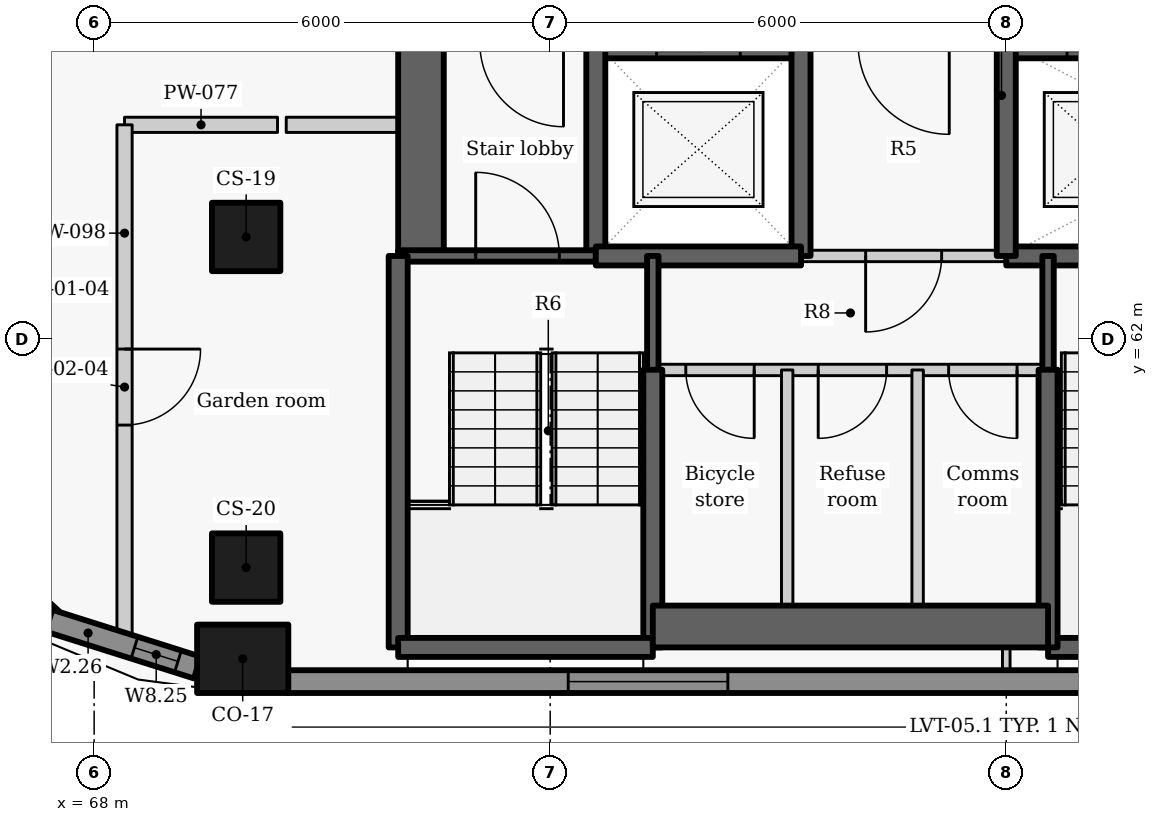
"""IFC4 building model, lengths in metres.
Left out: names, types, materials, properties, quantities, classifications, styles, units other than length and angle.
Written with IfcOpenShell. Run it as: python <this file> out.ifc"""

import sys

from ifc_helpers import new_model, si_unit, direction, frame, frame_2d, origin, origin_2d, place, context, subcontext, project, spatial, rectangle, extrude, element, fill, save


model = new_model("IFC4")
c1 = context("Model", 3, precision=1e-05, world=origin(), true_north=direction((0.0, 1.0)))
c2 = subcontext(c1, "Body", "Model", "MODEL_VIEW")
j1 = project(units=[si_unit("LENGTHUNIT", "METRE"), si_unit("PLANEANGLEUNIT", "RADIAN")], contexts=[c1])
p1 = place(None, origin())
s1 = spatial("IfcSite", under=j1, at=p1, CompositionType="ELEMENT")
p2 = place(p1, origin())
s2 = spatial("IfcBuilding", under=s1, at=p2, CompositionType="ELEMENT")
p3 = place(p2, frame((0.0, 0.0, 176.7)))
s3 = spatial("IfcBuildingStorey", under=s2, at=p3, CompositionType="ELEMENT", Elevation=176.7)
p4 = place(p3, frame((69.955, 57.8, 0.0), z_axis=(0.0, 0.0, 1.0), x_axis=(1.0, 0.0, 0.0)))
e1 = element("IfcColumn", 1, at=p4, inside=s3, PredefinedType="COLUMN", context=c2, shape_type="SweptSolid", body=[
    extrude(rectangle(XDim=1.2, YDim=0.9, at=origin_2d()), origin(), (0.0, 0.0, 1.0), 3.3),
])
for number, where, z_axis, x_axis in (
    (2, (70.0, 63.35, 0.0), (0.0, 0.0, 1.0), (0.0, -1.0, 0.0)),
    (3, (70.0, 59.0, 0.0), (0.0, 0.0, 1.0), (0.0, -1.0, 0.0)),
):
    element("IfcColumn", number, at=place(p3, frame(where, z_axis=z_axis, x_axis=x_axis)), inside=s3, PredefinedType="COLUMN", context=c2, shape_type="SweptSolid", body=[
        extrude(rectangle(XDim=0.9, YDim=0.9, at=origin_2d()), origin(), (0.0, 0.0, 1.0), 3.3),
    ])
p5 = place(p3, frame((66.022, 59.622, 0.0), z_axis=(0.0, 0.0, 1.0), x_axis=(0.734627852992, -0.678470277616, 0.0)))
e4 = element("IfcWall", 4, at=p5, inside=s3, PredefinedType="SOLIDWALL", context=c2, shape_type="SweptSolid", body=[
    extrude(rectangle(XDim=2.026, YDim=0.3, at=frame_2d((1.013, 0.0))), origin(), (0.0, 0.0, 1.0), 2.425),
])
p6 = place(p3, frame((67.406, 58.302, 0.0), z_axis=(0.0, 0.0, 1.0), x_axis=(0.953537608367, -0.301274010545, 0.0)))
e5 = element("IfcWall", 5, at=p6, inside=s3, PredefinedType="SOLIDWALL", context=c2, shape_type="SweptSolid", body=[
    extrude(rectangle(XDim=2.048, YDim=0.3, at=frame_2d((1.024, 0.0))), origin(), (0.0, 0.0, 1.0), 2.425),
])
p7 = place(p6, frame((1.18, 0.0, 0.9)))
e6 = element("IfcOpeningElement", 6, at=p7, cuts=e5, PredefinedType="OPENING", context=c2, shape_type="SweptSolid", body=[
    extrude(rectangle(XDim=0.6, YDim=1.1, at=frame_2d((0.3, 0.55))), frame((0.0, 0.16, 0.0), z_axis=(0.0, -1.0, 0.0), x_axis=(1.0, 0.0, 0.0)), (0.0, 0.0, 1.0), 0.32),
])
p8 = place(p3, frame((70.551, 57.5, 0.0), z_axis=(0.0, 0.0, 1.0), x_axis=(1.0, 0.0, 0.0)))
e7 = element("IfcWall", 7, at=p8, inside=s3, PredefinedType="SOLIDWALL", context=c2, shape_type="SweptSolid", body=[
    extrude(rectangle(XDim=18.893, YDim=0.3, at=frame_2d((9.446, 0.0))), origin(), (0.0, 0.0, 1.0), 2.425),
])
p9 = place(p8, frame((3.687, 0.0, 0.9)))
e8 = element("IfcOpeningElement", 8, at=p9, cuts=e7, PredefinedType="OPENING", context=c2, shape_type="SweptSolid", body=[
    extrude(rectangle(XDim=2.1, YDim=1.1, at=frame_2d((1.05, 0.55))), frame((0.0, 0.16, 0.0), z_axis=(0.0, -1.0, 0.0), x_axis=(1.0, 0.0, 0.0)), (0.0, 0.0, 1.0), 0.32),
])
p10 = place(p8, frame((13.109, 0.0, 0.9)))
e9 = element("IfcOpeningElement", 9, at=p10, cuts=e7, PredefinedType="OPENING", context=c2, shape_type="SweptSolid", body=[
    extrude(rectangle(XDim=2.1, YDim=1.1, at=frame_2d((1.05, 0.55))), frame((0.0, 0.16, 0.0), z_axis=(0.0, -1.0, 0.0), x_axis=(1.0, 0.0, 0.0)), (0.0, 0.0, 1.0), 0.32),
])
p11 = place(p3, frame((72.3, 63.1, -0.41), z_axis=(0.0, 0.0, 1.0), x_axis=(0.0, 1.0, 0.0)))
e10 = element("IfcWall", 10, at=p11, inside=s3, PredefinedType="SHEAR", context=c2, shape_type="SweptSolid", body=[
    extrude(rectangle(XDim=9.1, YDim=0.6, at=frame_2d((4.55, 0.0))), origin(), (0.0, 0.0, 1.0), 3.435),
])
p12 = place(p11, frame((3.748, 0.0, 0.41)))
e11 = element("IfcOpeningElement", 11, at=p12, cuts=e10, PredefinedType="OPENING", context=c2, shape_type="SweptSolid", body=[
    extrude(rectangle(XDim=1.5, YDim=2.1, at=frame_2d((0.75, 1.05))), frame((0.0, 0.31, 0.0), z_axis=(0.0, -1.0, 0.0), x_axis=(1.0, 0.0, 0.0)), (0.0, 0.0, 1.0), 0.62),
])
p13 = place(p3, frame((74.597, 65.9, -0.41), z_axis=(0.0, 0.0, 1.0), x_axis=(1.0, 0.0, 0.0)))
e12 = element("IfcWall", 12, at=p13, inside=s3, PredefinedType="SHEAR", context=c2, shape_type="SweptSolid", body=[
    extrude(rectangle(XDim=2.706, YDim=0.4, at=frame_2d((1.353, 0.0))), origin(), (0.0, 0.0, 1.0), 3.435),
])
p14 = place(p13, frame((0.803, 0.0, 0.41)))
e13 = element("IfcOpeningElement", 13, at=p14, cuts=e12, PredefinedType="OPENING", context=c2, shape_type="SweptSolid", body=[
    extrude(rectangle(XDim=1.1, YDim=2.1, at=frame_2d((0.55, 1.05))), frame((0.0, 0.21, 0.0), z_axis=(0.0, -1.0, 0.0), x_axis=(1.0, 0.0, 0.0)), (0.0, 0.0, 1.0), 0.42),
])
p15 = place(p3, frame((79.997, 65.9, -0.41), z_axis=(0.0, 0.0, 1.0), x_axis=(1.0, 0.0, 0.0)))
e14 = element("IfcWall", 14, at=p15, inside=s3, PredefinedType="SHEAR", context=c2, shape_type="SweptSolid", body=[
    extrude(rectangle(XDim=5.406, YDim=0.4, at=frame_2d((2.703, 0.0))), origin(), (0.0, 0.0, 1.0), 3.435),
])
p16 = place(p15, frame((0.803, 0.0, 0.41)))
e15 = element("IfcOpeningElement", 15, at=p16, cuts=e14, PredefinedType="OPENING", context=c2, shape_type="SweptSolid", body=[
    extrude(rectangle(XDim=1.1, YDim=2.1, at=frame_2d((0.55, 1.05))), frame((0.0, 0.21, 0.0), z_axis=(0.0, -1.0, 0.0), x_axis=(1.0, 0.0, 0.0)), (0.0, 0.0, 1.0), 0.42),
])
p17 = place(p3, frame((74.6, 63.1, -0.41), z_axis=(0.0, 0.0, 1.0), x_axis=(0.0, 1.0, 0.0)))
e16 = element("IfcWall", 16, at=p17, inside=s3, PredefinedType="SHEAR", context=c2, shape_type="SweptSolid", body=[
    extrude(rectangle(XDim=2.8, YDim=0.25, at=frame_2d((1.4, 0.0))), origin(), (0.0, 0.0, 1.0), 3.435),
])
p18 = place(p3, frame((72.0, 63.1, -0.41), z_axis=(0.0, 0.0, 1.0), x_axis=(1.0, 0.0, 0.0)))
e17 = element("IfcWall", 17, at=p18, inside=s3, PredefinedType="SHEAR", context=c2, shape_type="SweptSolid", body=[
    extrude(rectangle(XDim=2.6, YDim=0.15, at=frame_2d((1.3, 0.0))), origin(), (0.0, 0.0, 1.0), 3.435),
])
p19 = place(p18, frame((1.02, 0.0, 0.41)))
e18 = element("IfcOpeningElement", 18, at=p19, cuts=e17, PredefinedType="OPENING", context=c2, shape_type="SweptSolid", body=[
    extrude(rectangle(XDim=1.1, YDim=2.1, at=frame_2d((0.55, 1.05))), frame((0.0, 0.085, 0.0), z_axis=(0.0, -1.0, 0.0), x_axis=(1.0, 0.0, 0.0)), (0.0, 0.0, 1.0), 0.17),
])
p20 = place(p3, frame((77.3, 63.1, -0.41), z_axis=(0.0, 0.0, 1.0), x_axis=(0.0, 1.0, 0.0)))
e19 = element("IfcWall", 19, at=p20, inside=s3, PredefinedType="SHEAR", context=c2, shape_type="SweptSolid", body=[
    extrude(rectangle(XDim=2.8, YDim=0.25, at=frame_2d((1.4, 0.0))), origin(), (0.0, 0.0, 1.0), 3.435),
])
p21 = place(p3, frame((74.6, 63.1, -0.41), z_axis=(0.0, 0.0, 1.0), x_axis=(1.0, 0.0, 0.0)))
e20 = element("IfcWall", 20, at=p21, inside=s3, PredefinedType="SHEAR", context=c2, shape_type="SweptSolid", body=[
    extrude(rectangle(XDim=2.7, YDim=0.25, at=frame_2d((1.35, 0.0))), origin(), (0.0, 0.0, 1.0), 3.435),
])
p22 = place(p3, frame((80.0, 63.1, -0.41), z_axis=(0.0, 0.0, 1.0), x_axis=(1.0, 0.0, 0.0)))
e21 = element("IfcWall", 21, at=p22, inside=s3, PredefinedType="SHEAR", context=c2, shape_type="SweptSolid", body=[
    extrude(rectangle(XDim=8.0, YDim=0.25, at=frame_2d((4.0, 0.0))), origin(), (0.0, 0.0, 1.0), 3.435),
])
p23 = place(p22, frame((3.849, 0.0, 0.41)))
e22 = element("IfcOpeningElement", 22, at=p23, cuts=e21, PredefinedType="OPENING", context=c2, shape_type="SweptSolid", body=[
    extrude(rectangle(XDim=1.1, YDim=2.1, at=frame_2d((0.55, 1.05))), frame((0.0, 0.135, 0.0), z_axis=(0.0, -1.0, 0.0), x_axis=(1.0, 0.0, 0.0)), (0.0, 0.0, 1.0), 0.27),
])
p24 = place(p3, frame((80.0, 63.1, -0.41), z_axis=(0.0, 0.0, 1.0), x_axis=(0.0, 1.0, 0.0)))
e23 = element("IfcWall", 23, at=p24, inside=s3, PredefinedType="SHEAR", context=c2, shape_type="SweptSolid", body=[
    extrude(rectangle(XDim=2.8, YDim=0.25, at=frame_2d((1.4, 0.0))), origin(), (0.0, 0.0, 1.0), 3.435),
])
p25 = place(p3, frame((80.0, 63.1, 0.0), z_axis=(0.0, 0.0, 1.0), x_axis=(-1.0, 0.0, 0.0)))
e24 = element("IfcWall", 24, at=p25, inside=s3, PredefinedType="PARTITIONING", context=c2, shape_type="SweptSolid", body=[
    extrude(rectangle(XDim=2.7, YDim=0.15, at=frame_2d((1.35, 0.0))), origin(), (0.0, 0.0, 1.0), 3.025),
])
p26 = place(p25, frame((0.85, 0.0, 0.0)))
e25 = element("IfcOpeningElement", 25, at=p26, cuts=e24, PredefinedType="OPENING", context=c2, shape_type="SweptSolid", body=[
    extrude(rectangle(XDim=1.0, YDim=2.1, at=frame_2d((0.5, 1.05))), frame((0.0, 0.085, 0.0), z_axis=(0.0, -1.0, 0.0), x_axis=(1.0, 0.0, 0.0)), (0.0, 0.0, 1.0), 0.17),
])
p27 = place(p3, frame((75.35, 61.597, -0.41), z_axis=(0.0, 0.0, 1.0), x_axis=(0.0, 1.0, 0.0)))
e26 = element("IfcWall", 26, at=p27, inside=s3, PredefinedType="SHEAR", context=c2, shape_type="SweptSolid", body=[
    extrude(rectangle(XDim=1.503, YDim=0.15, at=frame_2d((0.751, 0.0))), origin(), (0.0, 0.0, 1.0), 3.435),
])
p28 = place(p3, frame((75.35, 57.95, -0.41), z_axis=(0.0, 0.0, 1.0), x_axis=(0.0, 1.0, 0.0)))
e27 = element("IfcWall", 27, at=p28, inside=s3, PredefinedType="SHEAR", context=c2, shape_type="SweptSolid", body=[
    extrude(rectangle(XDim=3.653, YDim=0.25, at=frame_2d((1.827, 0.0))), origin(), (0.0, 0.0, 1.0), 3.435),
])
p29 = place(p3, frame((72.0, 57.95, -0.41), z_axis=(0.0, 0.0, 1.0), x_axis=(0.0, 1.0, 0.0)))
e28 = element("IfcWall", 28, at=p29, inside=s3, PredefinedType="SHEAR", context=c2, shape_type="SweptSolid", body=[
    extrude(rectangle(XDim=5.15, YDim=0.25, at=frame_2d((2.575, 0.0))), origin(), (0.0, 0.0, 1.0), 3.435),
])
p30 = place(p3, frame((72.0, 57.95, 0.0), z_axis=(0.0, 0.0, 1.0), x_axis=(1.0, 0.0, 0.0)))
e29 = element("IfcWall", 29, at=p30, inside=s3, PredefinedType="SHEAR", context=c2, shape_type="SweptSolid", body=[
    extrude(rectangle(XDim=3.35, YDim=0.25, at=frame_2d((1.675, 0.0))), origin(), (0.0, 0.0, 1.0), 3.025),
])
p31 = place(p3, frame((80.55, 57.95, 0.0), z_axis=(0.0, 0.0, 1.0), x_axis=(1.0, 0.0, 0.0)))
e30 = element("IfcWall", 30, at=p31, inside=s3, PredefinedType="SHEAR", context=c2, shape_type="SweptSolid", body=[
    extrude(rectangle(XDim=2.85, YDim=0.25, at=frame_2d((1.425, 0.0))), origin(), (0.0, 0.0, 1.0), 3.025),
])
p32 = place(p3, frame((80.55, 61.597, -0.41), z_axis=(0.0, 0.0, 1.0), x_axis=(0.0, 1.0, 0.0)))
e31 = element("IfcWall", 31, at=p32, inside=s3, PredefinedType="SHEAR", context=c2, shape_type="SweptSolid", body=[
    extrude(rectangle(XDim=1.503, YDim=0.15, at=frame_2d((0.751, 0.0))), origin(), (0.0, 0.0, 1.0), 3.435),
])
p33 = place(p3, frame((80.55, 57.95, -0.41), z_axis=(0.0, 0.0, 1.0), x_axis=(0.0, 1.0, 0.0)))
e32 = element("IfcWall", 32, at=p33, inside=s3, PredefinedType="SHEAR", context=c2, shape_type="SweptSolid", body=[
    extrude(rectangle(XDim=3.653, YDim=0.25, at=frame_2d((1.827, 0.0))), origin(), (0.0, 0.0, 1.0), 3.435),
])
p34 = place(p3, frame((75.35, 58.225, 0.0), z_axis=(0.0, 0.0, 1.0), x_axis=(1.0, 0.0, 0.0)))
e33 = element("IfcWall", 33, at=p34, inside=s3, PredefinedType="SHEAR", context=c2, shape_type="SweptSolid", body=[
    extrude(rectangle(XDim=5.2, YDim=0.55, at=frame_2d((2.6, 0.0))), origin(), (0.0, 0.0, 1.0), 3.025),
])
p35 = place(p3, frame((80.55, 61.6, 0.0), z_axis=(0.0, 0.0, 1.0), x_axis=(-1.0, 0.0, 0.0)))
e34 = element("IfcWall", 34, at=p35, inside=s3, PredefinedType="PARTITIONING", context=c2, shape_type="SweptSolid", body=[
    extrude(rectangle(XDim=5.2, YDim=0.15, at=frame_2d((2.6, 0.0))), origin(), (0.0, 0.0, 1.0), 3.025),
])
p36 = place(p35, frame((3.866, 0.0, 0.0)))
e35 = element("IfcOpeningElement", 35, at=p36, cuts=e34, PredefinedType="OPENING", context=c2, shape_type="SweptSolid", body=[
    extrude(rectangle(XDim=0.9, YDim=2.1, at=frame_2d((0.45, 1.05))), frame((0.0, 0.085, 0.0), z_axis=(0.0, -1.0, 0.0), x_axis=(1.0, 0.0, 0.0)), (0.0, 0.0, 1.0), 0.17),
])
p37 = place(p35, frame((2.124, 0.0, 0.0)))
e36 = element("IfcOpeningElement", 36, at=p37, cuts=e34, PredefinedType="OPENING", context=c2, shape_type="SweptSolid", body=[
    extrude(rectangle(XDim=0.9, YDim=2.1, at=frame_2d((0.45, 1.05))), frame((0.0, 0.085, 0.0), z_axis=(0.0, -1.0, 0.0), x_axis=(1.0, 0.0, 0.0)), (0.0, 0.0, 1.0), 0.17),
])
p38 = place(p35, frame((0.408, 0.0, 0.0)))
e37 = element("IfcOpeningElement", 37, at=p38, cuts=e34, PredefinedType="OPENING", context=c2, shape_type="SweptSolid", body=[
    extrude(rectangle(XDim=0.9, YDim=2.1, at=frame_2d((0.45, 1.05))), frame((0.0, 0.085, 0.0), z_axis=(0.0, -1.0, 0.0), x_axis=(1.0, 0.0, 0.0)), (0.0, 0.0, 1.0), 0.17),
])
for number, where, z_axis, x_axis in (
    (38, (77.118, 57.95, 0.0), (0.0, 0.0, 1.0), (0.0, 1.0, 0.0)),
    (39, (78.834, 57.95, 0.0), (0.0, 0.0, 1.0), (0.0, 1.0, 0.0)),
):
    element("IfcWall", number, at=place(p3, frame(where, z_axis=z_axis, x_axis=x_axis)), inside=s3, PredefinedType="PARTITIONING", context=c2, shape_type="SweptSolid", body=[
        extrude(rectangle(XDim=3.65, YDim=0.15, at=frame_2d((1.825, 0.0))), origin(), (0.0, 0.0, 1.0), 3.025),
    ])
p39 = place(p3, frame((68.4, 64.825, 0.0), z_axis=(0.0, 0.0, 1.0), x_axis=(1.0, 0.0, 0.0)))
e40 = element("IfcWall", 40, at=p39, inside=s3, PredefinedType="PARTITIONING", context=c2, shape_type="SweptSolid", body=[
    extrude(rectangle(XDim=2.013, YDim=0.2, at=frame_2d((1.006, 0.0))), origin(), (0.0, 0.0, 1.0), 2.505),
])
p40 = place(p3, frame((70.527, 64.825, 0.0), z_axis=(0.0, 0.0, 1.0), x_axis=(1.0, 0.0, 0.0)))
e41 = element("IfcWall", 41, at=p40, inside=s3, PredefinedType="PARTITIONING", context=c2, shape_type="SweptSolid", body=[
    extrude(rectangle(XDim=1.473, YDim=0.2, at=frame_2d((0.736, 0.0))), origin(), (0.0, 0.0, 1.0), 3.025),
])
p41 = place(p3, frame((68.4, 64.825, 0.0), z_axis=(0.0, 0.0, 1.0), x_axis=(0.0, -1.0, 0.0)))
e42 = element("IfcWall", 42, at=p41, inside=s3, PredefinedType="PARTITIONING", context=c2, shape_type="SweptSolid", body=[
    extrude(rectangle(XDim=6.899, YDim=0.2, at=frame_2d((3.449, 0.0))), origin(), (0.0, 0.0, 1.0), 2.405),
])
p42 = place(p41, frame((2.95, 0.0, 0.0)))
e43 = element("IfcOpeningElement", 43, at=p42, cuts=e42, PredefinedType="OPENING", context=c2, shape_type="SweptSolid", body=[
    extrude(rectangle(XDim=1.0, YDim=2.1, at=frame_2d((0.5, 1.05))), frame((0.0, 0.11, 0.0), z_axis=(0.0, -1.0, 0.0), x_axis=(1.0, 0.0, 0.0)), (0.0, 0.0, 1.0), 0.22),
])
p43 = place(p3, frame((80.0, 57.65, 0.0), z_axis=(0.0, 0.0, 1.0), x_axis=(0.0, 1.0, 0.0)))
e44 = element("IfcWall", 44, at=p43, inside=s3, PredefinedType="PARTITIONING", context=c2, shape_type="SweptSolid", body=[
    extrude(rectangle(XDim=0.3, YDim=0.1, at=frame_2d((0.15, 0.0))), origin(), (0.0, 0.0, 1.0), 3.025),
])
p44 = place(p7, origin())
e45 = element("IfcWindow", 45, at=p44, inside=s3, PartitioningType="SINGLE_PANEL", PredefinedType="WINDOW", context=c2, shape_type="SweptSolid", body=[
    extrude(rectangle(XDim=0.6, YDim=1.1, at=frame_2d((0.3, 0.55))), frame((0.0, 0.03, 0.0), z_axis=(0.0, -1.0, 0.0), x_axis=(1.0, 0.0, 0.0)), (0.0, 0.0, 1.0), 0.06),
])
fill(e6, e45)
p45 = place(p9, origin())
e46 = element("IfcWindow", 46, at=p45, inside=s3, PartitioningType="SINGLE_PANEL", PredefinedType="WINDOW", context=c2, shape_type="SweptSolid", body=[
    extrude(rectangle(XDim=2.1, YDim=1.1, at=frame_2d((1.05, 0.55))), frame((0.0, 0.03, 0.0), z_axis=(0.0, -1.0, 0.0), x_axis=(1.0, 0.0, 0.0)), (0.0, 0.0, 1.0), 0.06),
])
fill(e8, e46)
p46 = place(p26, origin())
e47 = element("IfcDoor", 47, at=p46, inside=s3, OperationType="SINGLE_SWING_RIGHT", PredefinedType="DOOR", context=c2, shape_type="SweptSolid", body=[
    extrude(rectangle(XDim=1.0, YDim=2.1, at=frame_2d((0.5, 1.05))), frame((0.0, 0.025, 0.0), z_axis=(0.0, -1.0, 0.0), x_axis=(1.0, 0.0, 0.0)), (0.0, 0.0, 1.0), 0.05),
])
fill(e25, e47)
p47 = place(p36, origin())
e48 = element("IfcDoor", 48, at=p47, inside=s3, OperationType="SINGLE_SWING_LEFT", PredefinedType="DOOR", context=c2, shape_type="SweptSolid", body=[
    extrude(rectangle(XDim=0.9, YDim=2.1, at=frame_2d((0.45, 1.05))), frame((0.0, 0.025, 0.0), z_axis=(0.0, -1.0, 0.0), x_axis=(1.0, 0.0, 0.0)), (0.0, 0.0, 1.0), 0.05),
])
fill(e35, e48)
p48 = place(p37, origin())
e49 = element("IfcDoor", 49, at=p48, inside=s3, OperationType="SINGLE_SWING_RIGHT", PredefinedType="DOOR", context=c2, shape_type="SweptSolid", body=[
    extrude(rectangle(XDim=0.9, YDim=2.1, at=frame_2d((0.45, 1.05))), frame((0.0, 0.025, 0.0), z_axis=(0.0, -1.0, 0.0), x_axis=(1.0, 0.0, 0.0)), (0.0, 0.0, 1.0), 0.05),
])
fill(e36, e49)
p49 = place(p38, origin())
e50 = element("IfcDoor", 50, at=p49, inside=s3, OperationType="SINGLE_SWING_LEFT", PredefinedType="DOOR", context=c2, shape_type="SweptSolid", body=[
    extrude(rectangle(XDim=0.9, YDim=2.1, at=frame_2d((0.45, 1.05))), frame((0.0, 0.025, 0.0), z_axis=(0.0, -1.0, 0.0), x_axis=(1.0, 0.0, 0.0)), (0.0, 0.0, 1.0), 0.05),
])
fill(e37, e50)
p50 = place(p19, origin())
e51 = element("IfcDoor", 51, at=p50, inside=s3, OperationType="SINGLE_SWING_LEFT", PredefinedType="DOOR", context=c2, shape_type="SweptSolid", body=[
    extrude(rectangle(XDim=1.1, YDim=2.1, at=frame_2d((0.55, 1.05))), frame((0.0, 0.025, 0.0), z_axis=(0.0, -1.0, 0.0), x_axis=(1.0, 0.0, 0.0)), (0.0, 0.0, 1.0), 0.05),
])
fill(e18, e51)
p51 = place(p42, origin())
e52 = element("IfcDoor", 52, at=p51, inside=s3, OperationType="SINGLE_SWING_LEFT", PredefinedType="DOOR", context=c2, shape_type="SweptSolid", body=[
    extrude(rectangle(XDim=1.0, YDim=2.1, at=frame_2d((0.5, 1.05))), frame((0.0, 0.025, 0.0), z_axis=(0.0, -1.0, 0.0), x_axis=(1.0, 0.0, 0.0)), (0.0, 0.0, 1.0), 0.05),
])
fill(e43, e52)
save(model, sys.argv[1])
